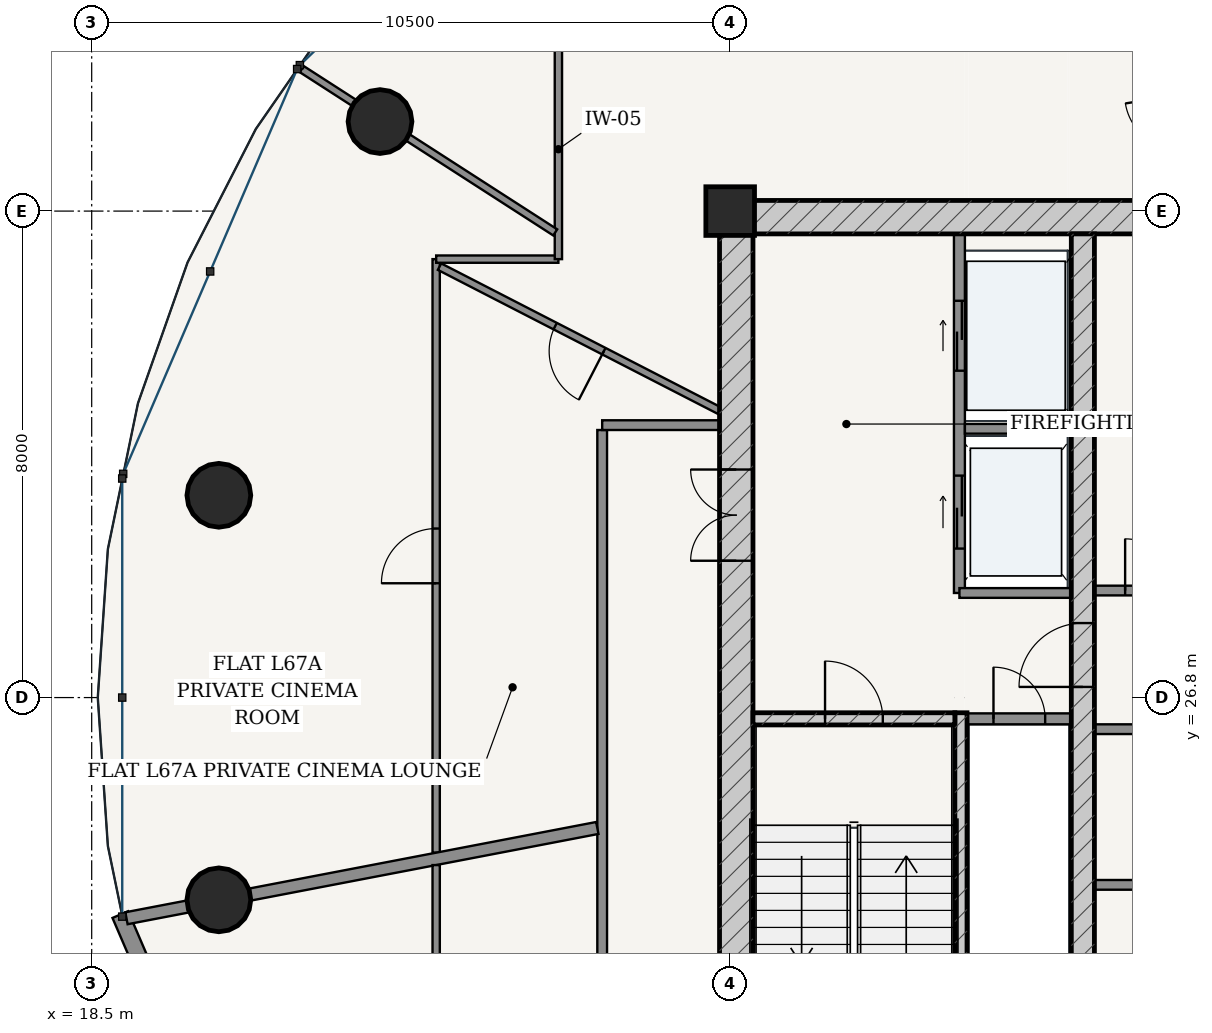
"""IFC4 building model, lengths in metres.
Left out: names, types, materials, properties, quantities, classifications, styles, units other than length and angle.
Written with IfcOpenShell. Run it as: python <this file> out.ifc"""

import sys

from ifc_helpers import new_model, si_unit, direction, frame, frame_2d, origin, origin_2d, place, context, subcontext, project, spatial, rectangle, hollow_circle, extrude, source, transform, mapped, element, fill, save


model = new_model("IFC4")
c1 = context("Model", 3, precision=1e-05, world=origin(), true_north=direction((-0.2419218956, 0.970295726276)))
c2 = subcontext(c1, "Body", "Model", "MODEL_VIEW")
j1 = project(units=[si_unit("LENGTHUNIT", "METRE"), si_unit("PLANEANGLEUNIT", "RADIAN")], contexts=[c1])
p1 = place(None, origin())
s1 = spatial("IfcSite", under=j1, at=p1, CompositionType="ELEMENT")
p2 = place(p1, origin())
s2 = spatial("IfcBuilding", under=s1, at=p2, CompositionType="ELEMENT")
p3 = place(p2, frame((0.0, 0.0, 255.7)))
s3 = spatial("IfcBuildingStorey", under=s2, at=p3, CompositionType="ELEMENT", Elevation=255.7)
p4 = place(p3, frame((29.0, 34.8, 0.0), z_axis=(0.0, 0.0, 1.0), x_axis=(1.0, 0.0, 0.0)))
e1 = element("IfcColumn", 1, at=p4, inside=s3, PredefinedType="COLUMN", context=c2, shape_type="SweptSolid", body=[
    extrude(rectangle(XDim=0.8, YDim=0.8, at=origin_2d()), origin(), (0.0, 0.0, 1.0), 3.75),
])
p5 = place(p3, frame((28.825, 34.7, 0.0), z_axis=(0.0, 0.0, 1.0), x_axis=(1.0, 0.0, 0.0)))
e2 = element("IfcWall", 2, at=p5, inside=s3, PredefinedType="SHEAR", context=c2, shape_type="SweptSolid", body=[
    extrude(rectangle(XDim=18.35, YDim=0.55, at=frame_2d((9.175, 0.0))), origin(), (0.0, 0.0, 1.0), 3.49),
])
p6 = place(p3, frame((29.1, 19.175, 0.0), z_axis=(0.0, 0.0, 1.0), x_axis=(0.0, 1.0, 0.0)))
e3 = element("IfcWall", 3, at=p6, inside=s3, PredefinedType="SHEAR", context=c2, shape_type="SweptSolid", body=[
    extrude(rectangle(XDim=15.25, YDim=0.55, at=frame_2d((7.625, 0.0))), origin(), (0.0, 0.0, 1.0), 3.49),
])
p7 = place(p6, frame((9.875, 0.0, 0.0)))
e4 = element("IfcOpeningElement", 4, at=p7, cuts=e3, PredefinedType="OPENING", context=c2, shape_type="SweptSolid", body=[
    extrude(rectangle(XDim=1.5, YDim=2.2, at=frame_2d((0.75, 1.1))), frame((0.0, 0.285, 0.0), z_axis=(0.0, -1.0, 0.0), x_axis=(1.0, 0.0, 0.0)), (0.0, 0.0, 1.0), 0.57),
])
p8 = place(p3, frame((32.795, 19.175, 0.0), z_axis=(0.0, 0.0, 1.0), x_axis=(0.0, 1.0, 0.0)))
e5 = element("IfcWall", 5, at=p8, inside=s3, PredefinedType="SOLIDWALL", context=c2, shape_type="SweptSolid", body=[
    extrude(rectangle(XDim=7.375, YDim=0.2, at=frame_2d((3.688, 0.0))), origin(), (0.0, 0.0, 1.0), 3.49),
])
p9 = place(p3, frame((29.375, 26.45, 0.0), z_axis=(0.0, 0.0, 1.0), x_axis=(1.0, 0.0, 0.0)))
e6 = element("IfcWall", 6, at=p9, inside=s3, PredefinedType="SOLIDWALL", context=c2, shape_type="SweptSolid", body=[
    extrude(rectangle(XDim=3.32, YDim=0.2, at=frame_2d((1.66, 0.0))), origin(), (0.0, 0.0, 1.0), 3.49),
])
p10 = place(p9, frame((1.185, 0.0, 0.0)))
e7 = element("IfcOpeningElement", 7, at=p10, cuts=e6, PredefinedType="OPENING", context=c2, shape_type="SweptSolid", body=[
    extrude(rectangle(XDim=0.95, YDim=2.15, at=frame_2d((0.475, 1.075))), frame((0.0, 0.11, 0.0), z_axis=(0.0, -1.0, 0.0), x_axis=(1.0, 0.0, 0.0)), (0.0, 0.0, 1.0), 0.22),
])
p11 = place(p3, frame((34.8, 19.175, 0.0), z_axis=(0.0, 0.0, 1.0), x_axis=(0.0, 1.0, 0.0)))
e8 = element("IfcWall", 8, at=p11, inside=s3, PredefinedType="SHEAR", context=c2, shape_type="SweptSolid", body=[
    extrude(rectangle(XDim=15.25, YDim=0.38, at=frame_2d((7.625, 0.0))), origin(), (0.0, 0.0, 1.0), 3.49),
])
p12 = place(p11, frame((7.8, 0.0, 0.0)))
e9 = element("IfcOpeningElement", 9, at=p12, cuts=e8, PredefinedType="OPENING", context=c2, shape_type="SweptSolid", body=[
    extrude(rectangle(XDim=1.05, YDim=2.15, at=frame_2d((0.525, 1.075))), frame((0.0, 0.2, 0.0), z_axis=(0.0, -1.0, 0.0), x_axis=(1.0, 0.0, 0.0)), (0.0, 0.0, 1.0), 0.4),
])
for number, where, z_axis, x_axis in (
    (10, (23.241, 36.272, 0.0), (0.0, 0.0, 1.0), (1.0, 0.0, 0.0)),
    (11, (20.591, 30.126, 0.0), (0.0, 0.0, 1.0), (1.0, 0.0, 0.0)),
    (12, (20.591, 23.474, 0.0), (0.0, 0.0, 1.0), (1.0, 0.0, 0.0)),
):
    element("IfcColumn", number, at=place(p3, frame(where, z_axis=z_axis, x_axis=x_axis)), inside=s3, PredefinedType="COLUMN", context=c2, shape_type="SweptSolid", body=[
        extrude(hollow_circle(Radius=0.525, WallThickness=0.035, at=origin_2d()), origin(), (0.0, 0.0, 1.0), 3.75),
    ])
p13 = place(p3, frame((18.971, 23.231, 0.0), z_axis=(0.0, 0.0, 1.0), x_axis=(0.394816612978, -0.918759948037, 0.0)))
e13 = element("IfcWall", 13, at=p13, inside=s3, PredefinedType="SOLIDWALL", context=c2, shape_type="SweptSolid", body=[
    extrude(rectangle(XDim=7.485, YDim=0.28, at=frame_2d((3.743, 0.0))), origin(), (0.0, 0.0, 1.0), 3.49),
])
p14 = place(p13, frame((1.246, 0.0, 0.85)))
e14 = element("IfcOpeningElement", 14, at=p14, cuts=e13, PredefinedType="OPENING", context=c2, shape_type="SweptSolid", body=[
    extrude(rectangle(XDim=1.55, YDim=1.95, at=frame_2d((0.775, 0.975))), frame((0.0, 0.15, 0.0), z_axis=(0.0, -1.0, 0.0), x_axis=(1.0, 0.0, 0.0)), (0.0, 0.0, 1.0), 0.3),
])
p15 = place(p13, frame((4.689, 0.0, 0.85)))
e15 = element("IfcOpeningElement", 15, at=p15, cuts=e13, PredefinedType="OPENING", context=c2, shape_type="SweptSolid", body=[
    extrude(rectangle(XDim=1.55, YDim=1.95, at=frame_2d((0.775, 0.975))), frame((0.0, 0.15, 0.0), z_axis=(0.0, -1.0, 0.0), x_axis=(1.0, 0.0, 0.0)), (0.0, 0.0, 1.0), 0.3),
])
p16 = place(p3, frame((32.9, 26.45, 0.0), z_axis=(0.0, 0.0, 1.0), x_axis=(1.0, 0.0, 0.0)))
e16 = element("IfcWall", 16, at=p16, inside=s3, PredefinedType="PARTITIONING", context=c2, shape_type="SweptSolid", body=[
    extrude(rectangle(XDim=1.71, YDim=0.18, at=frame_2d((0.855, 0.0))), origin(), (0.0, 0.0, 1.0), 3.49),
])
p17 = place(p16, frame((0.43, 0.0, 0.0)))
e17 = element("IfcOpeningElement", 17, at=p17, cuts=e16, PredefinedType="OPENING", context=c2, shape_type="SweptSolid", body=[
    extrude(rectangle(XDim=0.85, YDim=2.1, at=frame_2d((0.425, 1.05))), frame((0.0, 0.1, 0.0), z_axis=(0.0, -1.0, 0.0), x_axis=(1.0, 0.0, 0.0)), (0.0, 0.0, 1.0), 0.2),
])
p18 = place(p3, frame((32.77, 28.52, 0.0), z_axis=(0.0, 0.0, 1.0), x_axis=(0.0, 1.0, 0.0)))
e18 = element("IfcWall", 18, at=p18, inside=s3, PredefinedType="PARTITIONING", context=c2, shape_type="SweptSolid", body=[
    extrude(rectangle(XDim=5.905, YDim=0.18, at=frame_2d((2.953, 0.0))), origin(), (0.0, 0.0, 1.0), 3.49),
])
p19 = place(p18, frame((3.655, 0.0, 0.0)))
e19 = element("IfcOpeningElement", 19, at=p19, cuts=e18, PredefinedType="OPENING", context=c2, shape_type="SweptSolid", body=[
    extrude(rectangle(XDim=1.15, YDim=2.2, at=frame_2d((0.575, 1.1))), frame((0.0, 0.1, 0.0), z_axis=(0.0, -1.0, 0.0), x_axis=(1.0, 0.0, 0.0)), (0.0, 0.0, 1.0), 0.2),
])
p20 = place(p18, frame((0.73, 0.0, 0.0)))
e20 = element("IfcOpeningElement", 20, at=p20, cuts=e18, PredefinedType="OPENING", context=c2, shape_type="SweptSolid", body=[
    extrude(rectangle(XDim=1.2, YDim=2.25, at=frame_2d((0.6, 1.125))), frame((0.0, 0.1, 0.0), z_axis=(0.0, -1.0, 0.0), x_axis=(1.0, 0.0, 0.0)), (0.0, 0.0, 1.0), 0.2),
])
p21 = place(p3, frame((32.86, 31.22, 0.0), z_axis=(0.0, 0.0, 1.0), x_axis=(1.0, 0.0, 0.0)))
e21 = element("IfcWall", 21, at=p21, inside=s3, PredefinedType="PARTITIONING", context=c2, shape_type="SweptSolid", body=[
    extrude(rectangle(XDim=1.75, YDim=0.16, at=frame_2d((0.875, 0.0))), origin(), (0.0, 0.0, 1.0), 3.49),
])
p22 = place(p3, frame((32.77, 28.52, 0.0), z_axis=(0.0, 0.0, 1.0), x_axis=(1.0, 0.0, 0.0)))
e22 = element("IfcWall", 22, at=p22, inside=s3, PredefinedType="PARTITIONING", context=c2, shape_type="SweptSolid", body=[
    extrude(rectangle(XDim=1.84, YDim=0.16, at=frame_2d((0.92, 0.0))), origin(), (0.0, 0.0, 1.0), 3.49),
])
p23 = place(p3, frame((34.99, 28.56, 0.0), z_axis=(0.0, 0.0, 1.0), x_axis=(1.0, 0.0, 0.0)))
e23 = element("IfcWall", 23, at=p23, inside=s3, PredefinedType="PARTITIONING", context=c2, shape_type="SweptSolid", body=[
    extrude(rectangle(XDim=6.02, YDim=0.16, at=frame_2d((3.01, 0.0))), origin(), (0.0, 0.0, 1.0), 3.49),
])
p24 = place(p23, frame((0.505, 0.0, 0.0)))
e24 = element("IfcOpeningElement", 24, at=p24, cuts=e23, PredefinedType="OPENING", context=c2, shape_type="SweptSolid", body=[
    extrude(rectangle(XDim=0.85, YDim=2.1, at=frame_2d((0.425, 1.05))), frame((0.0, 0.09, 0.0), z_axis=(0.0, -1.0, 0.0), x_axis=(1.0, 0.0, 0.0)), (0.0, 0.0, 1.0), 0.18),
])
p25 = place(p23, frame((2.58, 0.0, 0.0)))
e25 = element("IfcOpeningElement", 25, at=p25, cuts=e23, PredefinedType="OPENING", context=c2, shape_type="SweptSolid", body=[
    extrude(rectangle(XDim=0.86, YDim=2.1, at=frame_2d((0.43, 1.05))), frame((0.0, 0.09, 0.0), z_axis=(0.0, -1.0, 0.0), x_axis=(1.0, 0.0, 0.0)), (0.0, 0.0, 1.0), 0.18),
])
p26 = place(p23, frame((4.665, 0.0, 0.0)))
e26 = element("IfcOpeningElement", 26, at=p26, cuts=e23, PredefinedType="OPENING", context=c2, shape_type="SweptSolid", body=[
    extrude(rectangle(XDim=0.85, YDim=2.1, at=frame_2d((0.425, 1.05))), frame((0.0, 0.09, 0.0), z_axis=(0.0, -1.0, 0.0), x_axis=(1.0, 0.0, 0.0)), (0.0, 0.0, 1.0), 0.18),
])
p27 = place(p3, frame((34.99, 26.28, 0.0), z_axis=(0.0, 0.0, 1.0), x_axis=(1.0, 0.0, 0.0)))
e27 = element("IfcWall", 27, at=p27, inside=s3, PredefinedType="PARTITIONING", context=c2, shape_type="SweptSolid", body=[
    extrude(rectangle(XDim=6.02, YDim=0.16, at=frame_2d((3.01, 0.0))), origin(), (0.0, 0.0, 1.0), 3.49),
])
p28 = place(p27, frame((1.045, 0.0, 0.0)))
e28 = element("IfcOpeningElement", 28, at=p28, cuts=e27, PredefinedType="OPENING", context=c2, shape_type="SweptSolid", body=[
    extrude(rectangle(XDim=0.85, YDim=2.1, at=frame_2d((0.425, 1.05))), frame((0.0, 0.09, 0.0), z_axis=(0.0, -1.0, 0.0), x_axis=(1.0, 0.0, 0.0)), (0.0, 0.0, 1.0), 0.18),
])
p29 = place(p27, frame((3.215, 0.0, 0.0)))
e29 = element("IfcOpeningElement", 29, at=p29, cuts=e27, PredefinedType="OPENING", context=c2, shape_type="SweptSolid", body=[
    extrude(rectangle(XDim=1.1, YDim=2.2, at=frame_2d((0.55, 1.1))), frame((0.0, 0.09, 0.0), z_axis=(0.0, -1.0, 0.0), x_axis=(1.0, 0.0, 0.0)), (0.0, 0.0, 1.0), 0.18),
])
p30 = place(p27, frame((4.695, 0.0, 0.0)))
e30 = element("IfcOpeningElement", 30, at=p30, cuts=e27, PredefinedType="OPENING", context=c2, shape_type="SweptSolid", body=[
    extrude(rectangle(XDim=1.1, YDim=2.2, at=frame_2d((0.55, 1.1))), frame((0.0, 0.09, 0.0), z_axis=(0.0, -1.0, 0.0), x_axis=(1.0, 0.0, 0.0)), (0.0, 0.0, 1.0), 0.18),
])
p31 = place(p3, frame((34.99, 23.72, 0.0), z_axis=(0.0, 0.0, 1.0), x_axis=(1.0, 0.0, 0.0)))
e31 = element("IfcWall", 31, at=p31, inside=s3, PredefinedType="PARTITIONING", context=c2, shape_type="SweptSolid", body=[
    extrude(rectangle(XDim=6.02, YDim=0.16, at=frame_2d((3.01, 0.0))), origin(), (0.0, 0.0, 1.0), 3.49),
])
p32 = place(p3, frame((26.895, 17.275, 0.0), z_axis=(0.0, 0.0, 1.0), x_axis=(0.0, 1.0, 0.0)))
e32 = element("IfcWall", 32, at=p32, inside=s3, PredefinedType="PARTITIONING", context=c2, shape_type="SweptSolid", body=[
    extrude(rectangle(XDim=13.925, YDim=0.16, at=frame_2d((6.962, 0.0))), origin(), (0.0, 0.0, 1.0), 3.015),
])
p33 = place(p3, frame((26.895, 31.28, 0.0), z_axis=(0.0, 0.0, 1.0), x_axis=(1.0, 0.0, 0.0)))
e33 = element("IfcWall", 33, at=p33, inside=s3, PredefinedType="PARTITIONING", context=c2, shape_type="SweptSolid", body=[
    extrude(rectangle(XDim=1.93, YDim=0.16, at=frame_2d((0.965, 0.0))), origin(), (0.0, 0.0, 1.0), 3.49),
])
p34 = place(p3, frame((24.165, 24.249, 0.0), z_axis=(0.0, 0.0, 1.0), x_axis=(0.0, 1.0, 0.0)))
e34 = element("IfcWall", 34, at=p34, inside=s3, PredefinedType="PARTITIONING", context=c2, shape_type="SweptSolid", body=[
    extrude(rectangle(XDim=9.761, YDim=0.12, at=frame_2d((4.88, 0.0))), origin(), (0.0, 0.0, 1.0), 3.015),
])
p35 = place(p34, frame((4.43, 0.0, 0.0)))
e35 = element("IfcOpeningElement", 35, at=p35, cuts=e34, PredefinedType="OPENING", context=c2, shape_type="SweptSolid", body=[
    extrude(rectangle(XDim=0.9, YDim=2.15, at=frame_2d((0.45, 1.075))), frame((0.0, 0.07, 0.0), z_axis=(0.0, -1.0, 0.0), x_axis=(1.0, 0.0, 0.0)), (0.0, 0.0, 1.0), 0.14),
])
p36 = place(p3, frame((24.165, 34.01, 0.0), z_axis=(0.0, 0.0, 1.0), x_axis=(1.0, 0.0, 0.0)))
e36 = element("IfcWall", 36, at=p36, inside=s3, PredefinedType="PARTITIONING", context=c2, shape_type="SweptSolid", body=[
    extrude(rectangle(XDim=2.01, YDim=0.12, at=frame_2d((1.005, 0.0))), origin(), (0.0, 0.0, 1.0), 3.209),
])
p37 = place(p3, frame((26.175, 34.01, 0.0), z_axis=(0.0, 0.0, 1.0), x_axis=(0.0, 1.0, 0.0)))
e37 = element("IfcWall", 37, at=p37, inside=s3, PredefinedType="PARTITIONING", context=c2, shape_type="SweptSolid", body=[
    extrude(rectangle(XDim=3.615, YDim=0.12, at=frame_2d((1.808, 0.0))), origin(), (0.0, 0.0, 1.0), 3.015),
])
p38 = place(p3, frame((26.123, 34.45, 0.0), z_axis=(0.0, 0.0, 1.0), x_axis=(-0.840703033126, 0.541496454367, 0.0)))
e38 = element("IfcWall", 38, at=p38, inside=s3, PredefinedType="PARTITIONING", context=c2, shape_type="SweptSolid", body=[
    extrude(rectangle(XDim=4.958, YDim=0.12, at=frame_2d((2.479, 0.0))), origin(), (0.0, 0.0, 1.0), 3.015),
])
p39 = place(p3, frame((28.825, 31.518, 0.0), z_axis=(0.0, 0.0, 1.0), x_axis=(-0.889305882583, 0.457312854842, 0.0)))
e39 = element("IfcWall", 39, at=p39, inside=s3, PredefinedType="PARTITIONING", context=c2, shape_type="SweptSolid", body=[
    extrude(rectangle(XDim=5.178, YDim=0.12, at=frame_2d((2.589, 0.0))), origin(), (0.0, 0.0, 1.0), 3.209),
])
p40 = place(p39, frame((2.139, 0.0, 0.0)))
e40 = element("IfcOpeningElement", 40, at=p40, cuts=e39, PredefinedType="OPENING", context=c2, shape_type="SweptSolid", body=[
    extrude(rectangle(XDim=0.9, YDim=2.15, at=frame_2d((0.45, 1.075))), frame((0.0, 0.07, 0.0), z_axis=(0.0, -1.0, 0.0), x_axis=(1.0, 0.0, 0.0)), (0.0, 0.0, 1.0), 0.14),
])
p41 = place(p3, frame((26.815, 24.656, 0.0), z_axis=(0.0, 0.0, 1.0), x_axis=(-0.982109889803, -0.188308694305, 0.0)))
e41 = element("IfcWall", 41, at=p41, inside=s3, PredefinedType="PARTITIONING", context=c2, shape_type="SweptSolid", body=[
    extrude(rectangle(XDim=7.884, YDim=0.2, at=frame_2d((3.942, 0.0))), origin(), (0.0, 0.0, 1.0), 3.015),
])
p42 = place(p3, frame((24.165, 14.465, 0.0), z_axis=(0.0, 0.0, 1.0), x_axis=(0.0, 1.0, 0.0)))
e42 = element("IfcWall", 42, at=p42, inside=s3, PredefinedType="PARTITIONING", context=c2, shape_type="SweptSolid", body=[
    extrude(rectangle(XDim=9.58, YDim=0.12, at=frame_2d((4.79, 0.0))), origin(), (0.0, 0.0, 1.0), 3.015),
])
p43 = place(p42, frame((0.879, 0.0, 0.0)))
e43 = element("IfcOpeningElement", 43, at=p43, cuts=e42, PredefinedType="OPENING", context=c2, shape_type="SweptSolid", body=[
    extrude(rectangle(XDim=0.9, YDim=2.15, at=frame_2d((0.45, 1.075))), frame((0.0, 0.07, 0.0), z_axis=(0.0, -1.0, 0.0), x_axis=(1.0, 0.0, 0.0)), (0.0, 0.0, 1.0), 0.14),
])
m1 = source(origin(), c2, "Body", "SweptSolid", [
    extrude(rectangle(XDim=1.5, YDim=2.2, at=frame_2d((0.75, 1.1))), frame((0.0, 0.025, 0.0), z_axis=(0.0, -1.0, 0.0), x_axis=(1.0, 0.0, 0.0)), (0.0, 0.0, 1.0), 0.05),
])
p44 = place(p7, origin())
e44 = element("IfcDoor", 44, at=p44, inside=s3, OperationType="DOUBLE_DOOR_SINGLE_SWING", PredefinedType="DOOR", context=c2, shape_type="MappedRepresentation", body=[
    mapped(m1, transform((0.0, 0.0, 0.0), scale=1.0)),
])
fill(e4, e44)
m2 = source(origin(), c2, "Body", "SweptSolid", [
    extrude(rectangle(XDim=1.05, YDim=2.15, at=frame_2d((0.525, 1.075))), frame((0.0, 0.025, 0.0), z_axis=(0.0, -1.0, 0.0), x_axis=(1.0, 0.0, 0.0)), (0.0, 0.0, 1.0), 0.05),
])
p45 = place(p12, origin())
e45 = element("IfcDoor", 45, at=p45, inside=s3, OperationType="SINGLE_SWING_LEFT", PredefinedType="DOOR", context=c2, shape_type="MappedRepresentation", body=[
    mapped(m2, transform((0.0, 0.0, 0.0), scale=1.0)),
])
fill(e9, e45)
m3 = source(origin(), c2, "Body", "SweptSolid", [
    extrude(rectangle(XDim=0.95, YDim=2.15, at=frame_2d((0.475, 1.075))), frame((0.0, 0.025, 0.0), z_axis=(0.0, -1.0, 0.0), x_axis=(1.0, 0.0, 0.0)), (0.0, 0.0, 1.0), 0.05),
])
p46 = place(p10, origin())
e46 = element("IfcDoor", 46, at=p46, inside=s3, OperationType="SINGLE_SWING_LEFT", PredefinedType="DOOR", context=c2, shape_type="MappedRepresentation", body=[
    mapped(m3, transform((0.0, 0.0, 0.0), scale=1.0)),
])
fill(e7, e46)
m4 = source(origin(), c2, "Body", "SweptSolid", [
    extrude(rectangle(XDim=0.85, YDim=2.1, at=frame_2d((0.425, 1.05))), frame((0.0, 0.025, 0.0), z_axis=(0.0, -1.0, 0.0), x_axis=(1.0, 0.0, 0.0)), (0.0, 0.0, 1.0), 0.05),
])
p47 = place(p17, origin())
e47 = element("IfcDoor", 47, at=p47, inside=s3, OperationType="SINGLE_SWING_LEFT", PredefinedType="DOOR", context=c2, shape_type="MappedRepresentation", body=[
    mapped(m4, transform((0.0, 0.0, 0.0), scale=1.0)),
])
fill(e17, e47)
p48 = place(p24, origin())
e48 = element("IfcDoor", 48, at=p48, inside=s3, OperationType="SINGLE_SWING_LEFT", PredefinedType="DOOR", context=c2, shape_type="MappedRepresentation", body=[
    mapped(m4, transform((0.0, 0.0, 0.0), scale=1.0)),
])
fill(e24, e48)
m5 = source(origin(), c2, "Body", "SweptSolid", [
    extrude(rectangle(XDim=1.15, YDim=2.2, at=frame_2d((0.575, 1.1))), frame((0.0, 0.025, 0.0), z_axis=(0.0, -1.0, 0.0), x_axis=(1.0, 0.0, 0.0)), (0.0, 0.0, 1.0), 0.05),
])
p49 = place(p19, origin())
e49 = element("IfcDoor", 49, at=p49, inside=s3, OperationType="DOUBLE_DOOR_SLIDING", PredefinedType="DOOR", context=c2, shape_type="MappedRepresentation", body=[
    mapped(m5, transform((0.0, 0.0, 0.0), scale=1.0)),
])
fill(e19, e49)
m6 = source(origin(), c2, "Body", "SweptSolid", [
    extrude(rectangle(XDim=1.2, YDim=2.25, at=frame_2d((0.6, 1.125))), frame((0.0, 0.025, 0.0), z_axis=(0.0, -1.0, 0.0), x_axis=(1.0, 0.0, 0.0)), (0.0, 0.0, 1.0), 0.05),
])
p50 = place(p20, origin())
e50 = element("IfcDoor", 50, at=p50, inside=s3, OperationType="DOUBLE_DOOR_SLIDING", PredefinedType="DOOR", context=c2, shape_type="MappedRepresentation", body=[
    mapped(m6, transform((0.0, 0.0, 0.0), scale=1.0)),
])
fill(e20, e50)
m7 = source(origin(), c2, "Body", "SweptSolid", [
    extrude(rectangle(XDim=0.9, YDim=2.15, at=frame_2d((0.45, 1.075))), frame((0.0, 0.025, 0.0), z_axis=(0.0, -1.0, 0.0), x_axis=(1.0, 0.0, 0.0)), (0.0, 0.0, 1.0), 0.05),
])
p51 = place(p40, origin())
e51 = element("IfcDoor", 51, at=p51, inside=s3, OperationType="SINGLE_SWING_LEFT", PredefinedType="DOOR", context=c2, shape_type="MappedRepresentation", body=[
    mapped(m7, transform((0.0, 0.0, 0.0), scale=1.0)),
])
fill(e40, e51)
p52 = place(p35, origin())
e52 = element("IfcDoor", 52, at=p52, inside=s3, OperationType="SINGLE_SWING_LEFT", PredefinedType="DOOR", context=c2, shape_type="MappedRepresentation", body=[
    mapped(m7, transform((0.0, 0.0, 0.0), scale=1.0)),
])
fill(e35, e52)
save(model, sys.argv[1])
